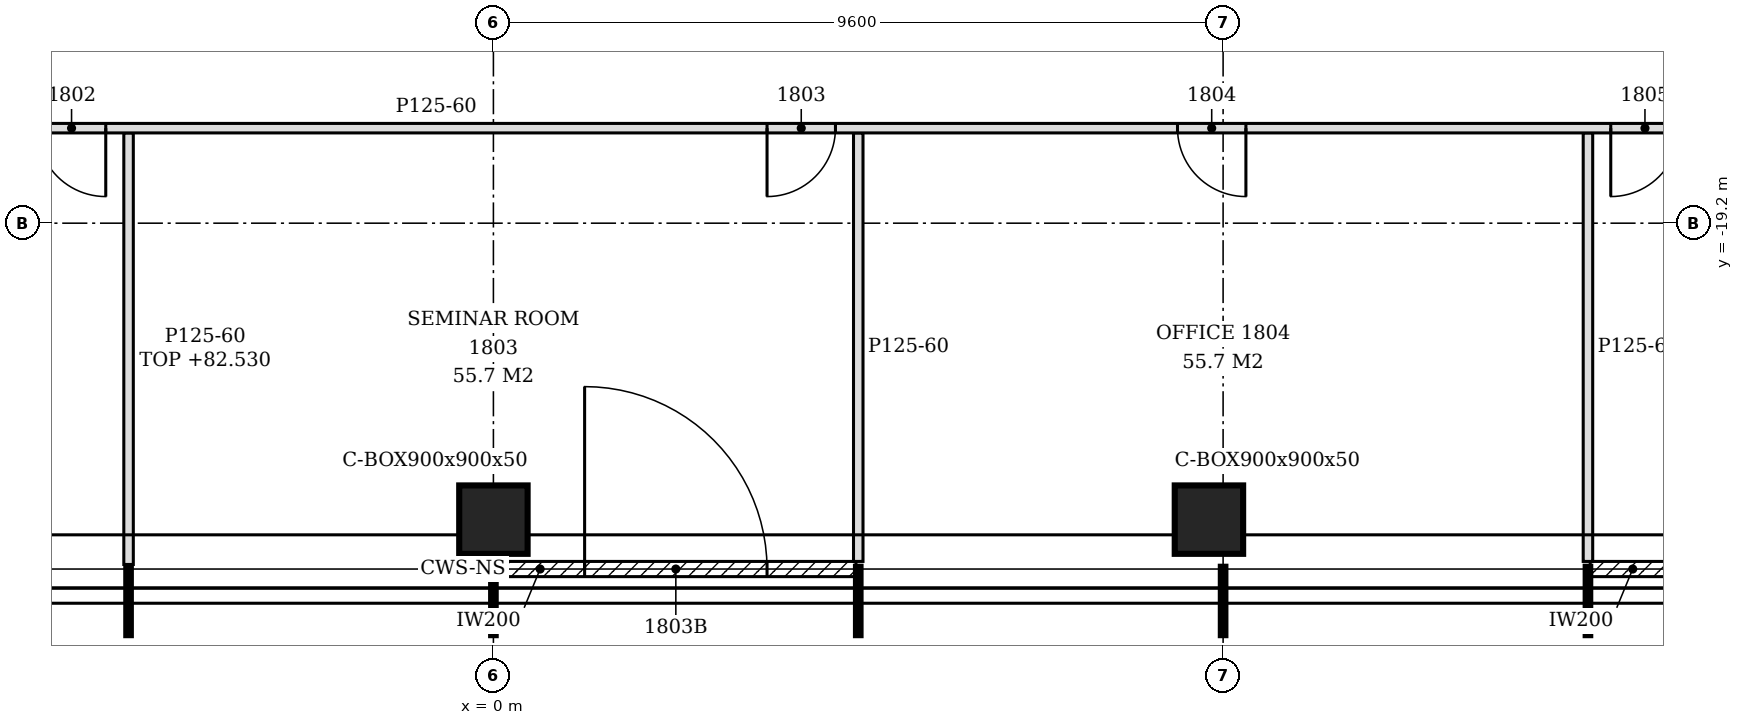
"""IFC4 building model, lengths in metres.
Left out: names, types, materials, properties, quantities, classifications, styles, units other than length and angle.
Written with IfcOpenShell. Run it as: python <this file> out.ifc"""

import sys

from ifc_helpers import new_model, si_unit, direction, frame, frame_2d, origin, origin_2d, place, context, subcontext, project, spatial, polyline, rectangle, hollow_rectangle, outline, extrude, element, fill, save


model = new_model("IFC4")
c1 = context("Model", 3, precision=1e-05, world=origin(), true_north=direction((0.0, 1.0)))
c2 = subcontext(c1, "Body", "Model", "MODEL_VIEW")
j1 = project(units=[si_unit("LENGTHUNIT", "METRE"), si_unit("PLANEANGLEUNIT", "RADIAN")], contexts=[c1])
p1 = place(None, origin())
s1 = spatial("IfcSite", under=j1, at=p1, CompositionType="ELEMENT")
p2 = place(p1, origin())
s2 = spatial("IfcBuilding", under=s1, at=p2, CompositionType="ELEMENT")
p3 = place(p2, frame((0.0, 0.0, 79.8)))
s3 = spatial("IfcBuildingStorey", under=s2, at=p3, CompositionType="ELEMENT", Elevation=79.8)
for number, where, z_axis, x_axis in (
    (1, (0.0, -23.1, -0.15), (0.0, 0.0, 1.0), (1.0, 0.0, 0.0)),
    (2, (9.414, -23.1, -0.15), (0.0, 0.0, 1.0), (1.0, 0.0, 0.0)),
):
    element("IfcColumn", number, at=place(p3, frame(where, z_axis=z_axis, x_axis=x_axis)), inside=s3, PredefinedType="COLUMN", context=c2, shape_type="SweptSolid", body=[
        extrude(hollow_rectangle(XDim=0.9, YDim=0.9, WallThickness=0.05, at=origin_2d()), origin(), (0.0, 0.0, 1.0), 3.6),
    ])
p4 = place(p3, frame((0.03, -23.75, 0.0), z_axis=(0.0, 0.0, 1.0), x_axis=(1.0, 0.0, 0.0)))
e3 = element("IfcWall", 3, at=p4, inside=s3, PredefinedType="NOTDEFINED", context=c2, shape_type="SweptSolid", body=[
    extrude(rectangle(XDim=4.74, YDim=0.2, at=frame_2d((2.37, 0.0))), origin(), (0.0, 0.0, 1.0), 3.45),
])
p5 = place(p4, frame((1.17, 0.0, 0.0)))
e4 = element("IfcOpeningElement", 4, at=p5, cuts=e3, PredefinedType="OPENING", context=c2, shape_type="SweptSolid", body=[
    extrude(rectangle(XDim=2.4, YDim=2.4, at=frame_2d((1.2, 1.2))), frame((0.0, 0.11, 0.0), z_axis=(0.0, -1.0, 0.0), x_axis=(1.0, 0.0, 0.0)), (0.0, 0.0, 1.0), 0.22),
])
p6 = place(p3, frame((14.43, -23.75, 0.0), z_axis=(0.0, 0.0, 1.0), x_axis=(1.0, 0.0, 0.0)))
e5 = element("IfcWall", 5, at=p6, inside=s3, PredefinedType="NOTDEFINED", context=c2, shape_type="SweptSolid", body=[
    extrude(rectangle(XDim=4.626, YDim=0.2, at=frame_2d((2.313, 0.0))), origin(), (0.0, 0.0, 1.0), 3.45),
])
p7 = place(p6, frame((1.118, 0.0, 0.0)))
e6 = element("IfcOpeningElement", 6, at=p7, cuts=e5, PredefinedType="OPENING", context=c2, shape_type="SweptSolid", body=[
    extrude(rectangle(XDim=2.4, YDim=2.4, at=frame_2d((1.2, 1.2))), frame((0.0, 0.11, 0.0), z_axis=(0.0, -1.0, 0.0), x_axis=(1.0, 0.0, 0.0)), (0.0, 0.0, 1.0), 0.22),
])
p8 = place(p3, frame((-4.8, -23.69, 0.0), z_axis=(0.0, 0.0, 1.0), x_axis=(0.0, 1.0, 0.0)))
e7 = element("IfcWall", 7, at=p8, inside=s3, PredefinedType="PARTITIONING", context=c2, shape_type="SweptSolid", body=[
    extrude(rectangle(XDim=5.677, YDim=0.125, at=frame_2d((2.839, 0.0))), origin(), (0.0, 0.0, 1.0), 2.73),
])
for number, where, z_axis, x_axis in (
    (8, (4.8, -23.65, 0.0), (0.0, 0.0, 1.0), (0.0, 1.0, 0.0)),
    (9, (14.4, -23.65, 0.0), (0.0, 0.0, 1.0), (0.0, 1.0, 0.0)),
):
    element("IfcWall", number, at=place(p3, frame(where, z_axis=z_axis, x_axis=x_axis)), inside=s3, PredefinedType="PARTITIONING", context=c2, shape_type="SweptSolid", body=[
        extrude(outline(polyline([(0.0, 0.0), (5.637, 0.0), (5.637, 3.45), (4.555, 3.45), (4.553, 2.88), (4.345, 2.88), (4.343, 3.45), (0.7, 3.45), (0.698, 2.93), (0.4, 2.93), (0.398, 3.45), (0.0, 3.45), (0.0, 0.0)])), frame((0.0, 0.062, 0.0), z_axis=(0.0, -1.0, 0.0), x_axis=(1.0, 0.0, 0.0)), (0.0, 0.0, 1.0), 0.125),
    ])
p9 = place(p3, frame((-20.75, -17.95, 0.0), z_axis=(0.0, 0.0, 1.0), x_axis=(1.0, 0.0, 0.0)))
e10 = element("IfcWall", 10, at=p9, inside=s3, PredefinedType="PARTITIONING", context=c2, shape_type="SweptSolid", body=[
    extrude(outline(polyline([(0.0, 0.0), (39.887, 0.0), (39.887, 2.73), (39.8, 2.73), (39.798, 3.45), (28.1, 3.45), (28.098, 2.73), (27.8, 2.73), (27.798, 3.45), (16.1, 3.45), (16.098, 2.73), (15.8, 2.73), (15.798, 3.45), (6.5, 3.45), (6.498, 2.93), (6.2, 2.93), (6.198, 3.45), (0.0, 3.45), (0.0, 0.0)])), frame((0.0, 0.062, 0.0), z_axis=(0.0, -1.0, 0.0), x_axis=(1.0, 0.0, 0.0)), (0.0, 0.0, 1.0), 0.125),
])
p10 = place(p9, frame((5.15, 0.0, 0.0)))
e11 = element("IfcOpeningElement", 11, at=p10, cuts=e10, PredefinedType="OPENING", context=c2, shape_type="SweptSolid", body=[
    extrude(rectangle(XDim=0.9, YDim=2.1, at=frame_2d((0.45, 1.05))), frame((0.0, 0.073, 0.0), z_axis=(0.0, -1.0, 0.0), x_axis=(1.0, 0.0, 0.0)), (0.0, 0.0, 1.0), 0.145),
])
p11 = place(p9, frame((14.75, 0.0, 0.0)))
e12 = element("IfcOpeningElement", 12, at=p11, cuts=e10, PredefinedType="OPENING", context=c2, shape_type="SweptSolid", body=[
    extrude(rectangle(XDim=0.9, YDim=2.1, at=frame_2d((0.45, 1.05))), frame((0.0, 0.073, 0.0), z_axis=(0.0, -1.0, 0.0), x_axis=(1.0, 0.0, 0.0)), (0.0, 0.0, 1.0), 0.145),
])
p12 = place(p9, frame((24.35, 0.0, 0.0)))
e13 = element("IfcOpeningElement", 13, at=p12, cuts=e10, PredefinedType="OPENING", context=c2, shape_type="SweptSolid", body=[
    extrude(rectangle(XDim=0.9, YDim=2.1, at=frame_2d((0.45, 1.05))), frame((0.0, 0.073, 0.0), z_axis=(0.0, -1.0, 0.0), x_axis=(1.0, 0.0, 0.0)), (0.0, 0.0, 1.0), 0.145),
])
p13 = place(p9, frame((29.75, 0.0, 0.0)))
e14 = element("IfcOpeningElement", 14, at=p13, cuts=e10, PredefinedType="OPENING", context=c2, shape_type="SweptSolid", body=[
    extrude(rectangle(XDim=0.9, YDim=2.1, at=frame_2d((0.45, 1.05))), frame((0.0, 0.073, 0.0), z_axis=(0.0, -1.0, 0.0), x_axis=(1.0, 0.0, 0.0)), (0.0, 0.0, 1.0), 0.145),
])
p14 = place(p9, frame((35.45, 0.0, 0.0)))
e15 = element("IfcOpeningElement", 15, at=p14, cuts=e10, PredefinedType="OPENING", context=c2, shape_type="SweptSolid", body=[
    extrude(rectangle(XDim=0.9, YDim=2.1, at=frame_2d((0.45, 1.05))), frame((0.0, 0.073, 0.0), z_axis=(0.0, -1.0, 0.0), x_axis=(1.0, 0.0, 0.0)), (0.0, 0.0, 1.0), 0.145),
])
p15 = place(p5, origin())
e16 = element("IfcDoor", 16, at=p15, inside=s3, OperationType="SINGLE_SWING_LEFT", PredefinedType="DOOR", context=c2, shape_type="SweptSolid", body=[
    extrude(rectangle(XDim=2.4, YDim=2.4, at=frame_2d((1.2, 1.2))), frame((0.0, 0.025, 0.0), z_axis=(0.0, -1.0, 0.0), x_axis=(1.0, 0.0, 0.0)), (0.0, 0.0, 1.0), 0.05),
])
fill(e4, e16)
p16 = place(p11, frame((0.9, 0.0, 0.0), z_axis=(0.0, 0.0, 1.0), x_axis=(-1.0, 0.0, 0.0)))
e17 = element("IfcDoor", 17, at=p16, inside=s3, OperationType="SINGLE_SWING_LEFT", PredefinedType="DOOR", context=c2, shape_type="SweptSolid", body=[
    extrude(rectangle(XDim=0.9, YDim=2.1, at=frame_2d((0.45, 1.05))), frame((0.0, 0.025, 0.0), z_axis=(0.0, -1.0, 0.0), x_axis=(1.0, 0.0, 0.0)), (0.0, 0.0, 1.0), 0.05),
])
fill(e12, e17)
p17 = place(p12, frame((0.9, 0.0, 0.0), z_axis=(0.0, 0.0, 1.0), x_axis=(-1.0, 0.0, 0.0)))
e18 = element("IfcDoor", 18, at=p17, inside=s3, OperationType="SINGLE_SWING_RIGHT", PredefinedType="DOOR", context=c2, shape_type="SweptSolid", body=[
    extrude(rectangle(XDim=0.9, YDim=2.1, at=frame_2d((0.45, 1.05))), frame((0.0, 0.025, 0.0), z_axis=(0.0, -1.0, 0.0), x_axis=(1.0, 0.0, 0.0)), (0.0, 0.0, 1.0), 0.05),
])
fill(e13, e18)
p18 = place(p13, frame((0.9, 0.0, 0.0), z_axis=(0.0, 0.0, 1.0), x_axis=(-1.0, 0.0, 0.0)))
e19 = element("IfcDoor", 19, at=p18, inside=s3, OperationType="SINGLE_SWING_LEFT", PredefinedType="DOOR", context=c2, shape_type="SweptSolid", body=[
    extrude(rectangle(XDim=0.9, YDim=2.1, at=frame_2d((0.45, 1.05))), frame((0.0, 0.025, 0.0), z_axis=(0.0, -1.0, 0.0), x_axis=(1.0, 0.0, 0.0)), (0.0, 0.0, 1.0), 0.05),
])
fill(e14, e19)
p19 = place(p14, frame((0.9, 0.0, 0.0), z_axis=(0.0, 0.0, 1.0), x_axis=(-1.0, 0.0, 0.0)))
e20 = element("IfcDoor", 20, at=p19, inside=s3, OperationType="SINGLE_SWING_RIGHT", PredefinedType="DOOR", context=c2, shape_type="SweptSolid", body=[
    extrude(rectangle(XDim=0.9, YDim=2.1, at=frame_2d((0.45, 1.05))), frame((0.0, 0.025, 0.0), z_axis=(0.0, -1.0, 0.0), x_axis=(1.0, 0.0, 0.0)), (0.0, 0.0, 1.0), 0.05),
])
fill(e15, e20)
save(model, sys.argv[1])
